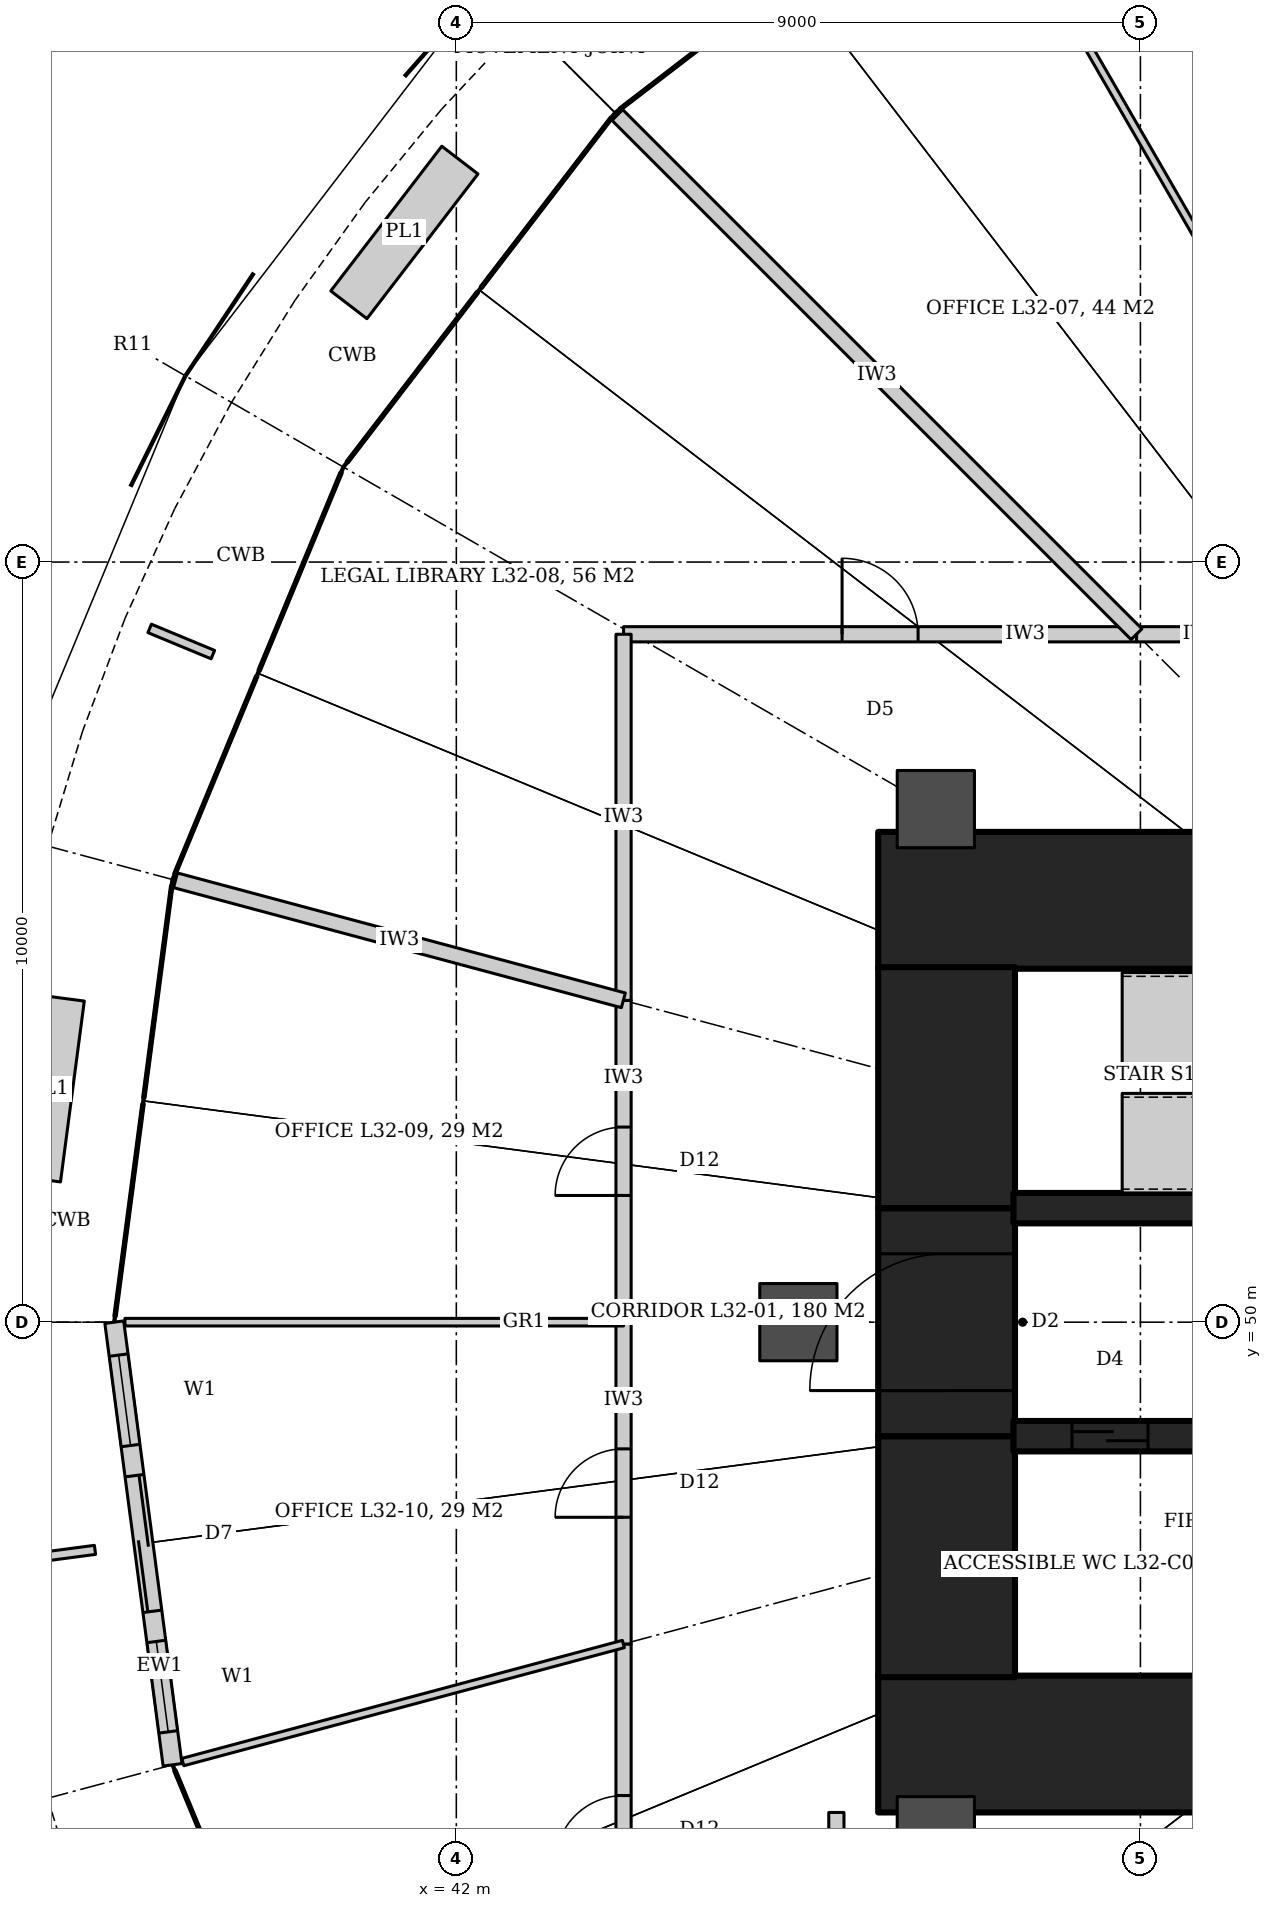
"""IFC4 building model, lengths in metres.
Left out: names, types, materials, properties, quantities, classifications, styles, units other than length and angle.
Written with IfcOpenShell. Run it as: python <this file> out.ifc"""

import sys

from ifc_helpers import new_model, si_unit, direction, frame, frame_2d, origin, origin_2d, place, context, subcontext, project, spatial, rectangle, hollow_circle, extrude, element, fill, save


model = new_model("IFC4")
c1 = context("Model", 3, precision=1e-05, world=origin(), true_north=direction((0.0, 1.0)))
c2 = subcontext(c1, "Body", "Model", "MODEL_VIEW")
j1 = project(units=[si_unit("LENGTHUNIT", "METRE"), si_unit("PLANEANGLEUNIT", "RADIAN")], contexts=[c1])
p1 = place(None, origin())
s1 = spatial("IfcSite", under=j1, at=p1, CompositionType="ELEMENT")
p2 = place(p1, origin())
s2 = spatial("IfcBuilding", under=s1, at=p2, CompositionType="ELEMENT")
p3 = place(p2, frame((0.0, 0.0, 135.2)))
s3 = spatial("IfcBuildingStorey", under=s2, at=p3, CompositionType="ELEMENT", Elevation=135.2)
for number, where, z_axis, x_axis in (
    (1, (47.55, 55.55, 0.0), (0.0, 0.0, 1.0), (1.0, 0.0, 0.0)),
    (2, (47.55, 44.45, 0.0), (0.0, 0.0, 1.0), (1.0, 0.0, 0.0)),
):
    element("IfcWall", number, at=place(p3, frame(where, z_axis=z_axis, x_axis=x_axis)), inside=s3, PredefinedType="SHEAR", context=c2, shape_type="SweptSolid", body=[
        extrude(rectangle(XDim=7.85, YDim=1.8, at=frame_2d((3.925, 0.0))), origin(), (0.0, 0.0, 1.0), 4.2),
    ])
p4 = place(p3, frame((48.45, 45.33, 0.0), z_axis=(0.0, 0.0, 1.0), x_axis=(0.0, 1.0, 0.0)))
e3 = element("IfcWall", 3, at=p4, inside=s3, PredefinedType="SHEAR", context=c2, shape_type="SweptSolid", body=[
    extrude(rectangle(XDim=3.17, YDim=1.8, at=frame_2d((1.585, 0.0))), origin(), (0.0, 0.0, 1.0), 4.2),
])
p5 = place(p3, frame((48.45, 48.5, 0.0), z_axis=(0.0, 0.0, 1.0), x_axis=(0.0, 1.0, 0.0)))
e4 = element("IfcWall", 4, at=p5, inside=s3, PredefinedType="SHEAR", context=c2, shape_type="SweptSolid", body=[
    extrude(rectangle(XDim=3.0, YDim=1.8, at=frame_2d((1.5, 0.0))), origin(), (0.0, 0.0, 1.0), 4.2),
])
p6 = place(p5, frame((0.6, 0.0, 0.0)))
e5 = element("IfcOpeningElement", 5, at=p6, cuts=e4, PredefinedType="OPENING", context=c2, shape_type="SweptSolid", body=[
    extrude(rectangle(XDim=1.8, YDim=2.1, at=frame_2d((0.9, 1.05))), frame((0.0, 0.91, 0.0), z_axis=(0.0, -1.0, 0.0), x_axis=(1.0, 0.0, 0.0)), (0.0, 0.0, 1.0), 1.82),
])
p7 = place(p3, frame((48.45, 51.5, 0.0), z_axis=(0.0, 0.0, 1.0), x_axis=(0.0, 1.0, 0.0)))
e6 = element("IfcWall", 6, at=p7, inside=s3, PredefinedType="SHEAR", context=c2, shape_type="SweptSolid", body=[
    extrude(rectangle(XDim=3.17, YDim=1.8, at=frame_2d((1.585, 0.0))), origin(), (0.0, 0.0, 1.0), 4.2),
])
p8 = place(p3, frame((49.33, 51.5, 0.0), z_axis=(0.0, 0.0, 1.0), x_axis=(1.0, 0.0, 0.0)))
e7 = element("IfcWall", 7, at=p8, inside=s3, PredefinedType="SHEAR", context=c2, shape_type="SweptSolid", body=[
    extrude(rectangle(XDim=6.07, YDim=0.4, at=frame_2d((3.035, 0.0))), origin(), (0.0, 0.0, 1.0), 4.2),
])
p9 = place(p8, frame((4.57, 0.0, 0.0)))
e8 = element("IfcOpeningElement", 8, at=p9, cuts=e7, PredefinedType="OPENING", context=c2, shape_type="SweptSolid", body=[
    extrude(rectangle(XDim=1.0, YDim=2.1, at=frame_2d((0.5, 1.05))), frame((0.0, 0.21, 0.0), z_axis=(0.0, -1.0, 0.0), x_axis=(1.0, 0.0, 0.0)), (0.0, 0.0, 1.0), 0.42),
])
p10 = place(p3, frame((49.33, 48.5, 0.0), z_axis=(0.0, 0.0, 1.0), x_axis=(1.0, 0.0, 0.0)))
e9 = element("IfcWall", 9, at=p10, inside=s3, PredefinedType="SHEAR", context=c2, shape_type="SweptSolid", body=[
    extrude(rectangle(XDim=6.07, YDim=0.4, at=frame_2d((3.035, 0.0))), origin(), (0.0, 0.0, 1.0), 4.2),
])
p11 = place(p10, frame((0.77, 0.0, 0.0)))
e10 = element("IfcOpeningElement", 10, at=p11, cuts=e9, PredefinedType="OPENING", context=c2, shape_type="SweptSolid", body=[
    extrude(rectangle(XDim=1.0, YDim=2.1, at=frame_2d((0.5, 1.05))), frame((0.0, 0.21, 0.0), z_axis=(0.0, -1.0, 0.0), x_axis=(1.0, 0.0, 0.0)), (0.0, 0.0, 1.0), 0.42),
])
p12 = place(p10, frame((2.87, 0.0, 0.0)))
e11 = element("IfcOpeningElement", 11, at=p12, cuts=e9, PredefinedType="OPENING", context=c2, shape_type="SweptSolid", body=[
    extrude(rectangle(XDim=0.9, YDim=2.1, at=frame_2d((0.45, 1.05))), frame((0.0, 0.21, 0.0), z_axis=(0.0, -1.0, 0.0), x_axis=(1.0, 0.0, 0.0)), (0.0, 0.0, 1.0), 0.42),
])
p13 = place(p10, frame((4.57, 0.0, 0.0)))
e12 = element("IfcOpeningElement", 12, at=p13, cuts=e9, PredefinedType="OPENING", context=c2, shape_type="SweptSolid", body=[
    extrude(rectangle(XDim=0.9, YDim=2.1, at=frame_2d((0.45, 1.05))), frame((0.0, 0.21, 0.0), z_axis=(0.0, -1.0, 0.0), x_axis=(1.0, 0.0, 0.0)), (0.0, 0.0, 1.0), 0.42),
])
for number, where, z_axis, x_axis in (
    (13, (48.309, 56.75, 0.0), (0.0, 0.0, 1.0), (1.0, 0.0, 0.0)),
    (14, (46.5, 50.0, 0.0), (0.0, 0.0, 1.0), (1.0, 0.0, 0.0)),
    (15, (48.309, 43.25, 0.0), (0.0, 0.0, 1.0), (1.0, 0.0, 0.0)),
):
    element("IfcColumn", number, at=place(p3, frame(where, z_axis=z_axis, x_axis=x_axis)), inside=s3, PredefinedType="COLUMN", context=c2, shape_type="SweptSolid", body=[
        extrude(hollow_circle(Radius=0.508, WallThickness=0.05, at=origin_2d()), origin(), (0.0, 0.0, 1.0), 4.2),
    ])
p14 = place(p3, frame((44.2, 59.05, 0.0), z_axis=(0.0, 0.0, 1.0), x_axis=(1.0, 0.0, 0.0)))
e16 = element("IfcWall", 16, at=p14, inside=s3, PredefinedType="PARTITIONING", context=c2, shape_type="SweptSolid", body=[
    extrude(rectangle(XDim=6.75, YDim=0.2, at=frame_2d((3.375, 0.0))), origin(), (0.0, 0.0, 1.0), 3.02),
])
p15 = place(p14, frame((2.875, 0.0, 0.0)))
e17 = element("IfcOpeningElement", 17, at=p15, cuts=e16, PredefinedType="OPENING", context=c2, shape_type="SweptSolid", body=[
    extrude(rectangle(XDim=1.0, YDim=2.1, at=frame_2d((0.5, 1.05))), frame((0.0, 0.11, 0.0), z_axis=(0.0, -1.0, 0.0), x_axis=(1.0, 0.0, 0.0)), (0.0, 0.0, 1.0), 0.22),
])
p16 = place(p3, frame((50.95, 59.05, 0.0), z_axis=(0.0, 0.0, 1.0), x_axis=(1.0, 0.0, 0.0)))
e18 = element("IfcWall", 18, at=p16, inside=s3, PredefinedType="PARTITIONING", context=c2, shape_type="SweptSolid", body=[
    extrude(rectangle(XDim=3.825, YDim=0.2, at=frame_2d((1.913, 0.0))), origin(), (0.0, 0.0, 1.0), 3.02),
])
p17 = place(p16, frame((1.462, 0.0, 0.0)))
e19 = element("IfcOpeningElement", 19, at=p17, cuts=e18, PredefinedType="OPENING", context=c2, shape_type="SweptSolid", body=[
    extrude(rectangle(XDim=0.9, YDim=2.4, at=frame_2d((0.45, 1.2))), frame((0.0, 0.11, 0.0), z_axis=(0.0, -1.0, 0.0), x_axis=(1.0, 0.0, 0.0)), (0.0, 0.0, 1.0), 0.22),
])
p18 = place(p3, frame((47.0, 43.55, 0.0), z_axis=(0.0, 0.0, 1.0), x_axis=(0.0, -1.0, 0.0)))
e20 = element("IfcWall", 20, at=p18, inside=s3, PredefinedType="PARTITIONING", context=c2, shape_type="SweptSolid", body=[
    extrude(rectangle(XDim=1.056, YDim=0.2, at=frame_2d((0.528, 0.0))), origin(), (0.0, 0.0, 1.0), 3.04),
])
p19 = place(p3, frame((44.2, 40.878, 0.0), z_axis=(0.0, 0.0, 1.0), x_axis=(0.0, 1.0, 0.0)))
e21 = element("IfcWall", 21, at=p19, inside=s3, PredefinedType="PARTITIONING", context=c2, shape_type="SweptSolid", body=[
    extrude(rectangle(XDim=4.888, YDim=0.2, at=frame_2d((2.444, 0.0))), origin(), (0.0, 0.0, 1.0), 3.04),
])
p20 = place(p19, frame((1.994, 0.0, 0.0)))
e22 = element("IfcOpeningElement", 22, at=p20, cuts=e21, PredefinedType="OPENING", context=c2, shape_type="SweptSolid", body=[
    extrude(rectangle(XDim=0.9, YDim=2.4, at=frame_2d((0.45, 1.2))), frame((0.0, 0.11, 0.0), z_axis=(0.0, -1.0, 0.0), x_axis=(1.0, 0.0, 0.0)), (0.0, 0.0, 1.0), 0.22),
])
p21 = place(p3, frame((44.2, 45.766, 0.0), z_axis=(0.0, 0.0, 1.0), x_axis=(0.0, 1.0, 0.0)))
e23 = element("IfcWall", 23, at=p21, inside=s3, PredefinedType="PARTITIONING", context=c2, shape_type="SweptSolid", body=[
    extrude(rectangle(XDim=4.234, YDim=0.2, at=frame_2d((2.117, 0.0))), origin(), (0.0, 0.0, 1.0), 3.04),
])
p22 = place(p21, frame((1.667, 0.0, 0.0)))
e24 = element("IfcOpeningElement", 24, at=p22, cuts=e23, PredefinedType="OPENING", context=c2, shape_type="SweptSolid", body=[
    extrude(rectangle(XDim=0.9, YDim=2.4, at=frame_2d((0.45, 1.2))), frame((0.0, 0.11, 0.0), z_axis=(0.0, -1.0, 0.0), x_axis=(1.0, 0.0, 0.0)), (0.0, 0.0, 1.0), 0.22),
])
p23 = place(p3, frame((44.2, 50.0, 0.0), z_axis=(0.0, 0.0, 1.0), x_axis=(0.0, 1.0, 0.0)))
e25 = element("IfcWall", 25, at=p23, inside=s3, PredefinedType="PARTITIONING", context=c2, shape_type="SweptSolid", body=[
    extrude(rectangle(XDim=4.234, YDim=0.2, at=frame_2d((2.117, 0.0))), origin(), (0.0, 0.0, 1.0), 3.04),
])
p24 = place(p23, frame((1.667, 0.0, 0.0)))
e26 = element("IfcOpeningElement", 26, at=p24, cuts=e25, PredefinedType="OPENING", context=c2, shape_type="SweptSolid", body=[
    extrude(rectangle(XDim=0.9, YDim=2.4, at=frame_2d((0.45, 1.2))), frame((0.0, 0.11, 0.0), z_axis=(0.0, -1.0, 0.0), x_axis=(1.0, 0.0, 0.0)), (0.0, 0.0, 1.0), 0.22),
])
p25 = place(p3, frame((44.2, 54.234, 0.0), z_axis=(0.0, 0.0, 1.0), x_axis=(0.0, 1.0, 0.0)))
e27 = element("IfcWall", 27, at=p25, inside=s3, PredefinedType="PARTITIONING", context=c2, shape_type="SweptSolid", body=[
    extrude(rectangle(XDim=4.816, YDim=0.2, at=frame_2d((2.408, 0.0))), origin(), (0.0, 0.0, 1.0), 3.04),
])
p26 = place(p3, frame((52.916, 62.27, 0.0), z_axis=(0.0, 0.0, 1.0), x_axis=(-0.499996941814, 0.866027169422, 0.0)))
e28 = element("IfcWall", 28, at=p26, inside=s3, PredefinedType="PARTITIONING", context=c2, shape_type="SweptSolid", body=[
    extrude(rectangle(XDim=8.392, YDim=0.1, at=frame_2d((4.196, 0.0))), origin(), (0.0, 0.0, 1.0), 3.04),
])
p27 = place(p3, frame((50.949, 59.051, 0.0), z_axis=(0.0, 0.0, 1.0), x_axis=(-0.707106781187, 0.707106781187, 0.0)))
e29 = element("IfcWall", 29, at=p27, inside=s3, PredefinedType="PARTITIONING", context=c2, shape_type="SweptSolid", body=[
    extrude(rectangle(XDim=9.76, YDim=0.2, at=frame_2d((4.88, 0.0))), origin(), (0.0, 0.0, 1.0), 3.02),
])
p28 = place(p3, frame((44.198, 54.234, 0.0), z_axis=(0.0, 0.0, 1.0), x_axis=(-0.965923795283, 0.258826624802, 0.0)))
e30 = element("IfcWall", 30, at=p28, inside=s3, PredefinedType="PARTITIONING", context=c2, shape_type="SweptSolid", body=[
    extrude(rectangle(XDim=6.2, YDim=0.2, at=frame_2d((3.1, 0.0))), origin(), (0.0, 0.0, 1.0), 3.04),
])
p29 = place(p3, frame((44.2, 50.0, 0.0), z_axis=(0.0, 0.0, 1.0), x_axis=(-1.0, 0.0, 0.0)))
e31 = element("IfcWall", 31, at=p29, inside=s3, PredefinedType="PARTITIONING", context=c2, shape_type="SweptSolid", body=[
    extrude(rectangle(XDim=6.66, YDim=0.1, at=frame_2d((3.33, 0.0))), origin(), (0.0, 0.0, 1.0), 3.04),
])
p30 = place(p3, frame((44.198, 45.766, 0.0), z_axis=(0.0, 0.0, 1.0), x_axis=(-0.965932688119, -0.258793435045, 0.0)))
e32 = element("IfcWall", 32, at=p30, inside=s3, PredefinedType="PARTITIONING", context=c2, shape_type="SweptSolid", body=[
    extrude(rectangle(XDim=6.1, YDim=0.1, at=frame_2d((3.05, 0.0))), origin(), (0.0, 0.0, 1.0), 3.04),
])
p31 = place(p3, frame((37.4, 50.0, 0.0), z_axis=(0.0, 0.0, 1.0), x_axis=(0.130556203128, -0.991440909901, 0.0)))
e33 = element("IfcWall", 33, at=p31, inside=s3, PredefinedType="SOLIDWALL", context=c2, shape_type="SweptSolid", body=[
    extrude(rectangle(XDim=5.9, YDim=0.25, at=frame_2d((2.95, 0.0))), origin(), (0.0, 0.0, 1.0), 4.04),
])
p32 = place(p31, frame((2.05, 0.0, 0.0)))
e34 = element("IfcOpeningElement", 34, at=p32, cuts=e33, PredefinedType="OPENING", context=c2, shape_type="SweptSolid", body=[
    extrude(rectangle(XDim=1.8, YDim=2.4, at=frame_2d((0.9, 1.2))), frame((0.0, 0.135, 0.0), z_axis=(0.0, -1.0, 0.0), x_axis=(1.0, 0.0, 0.0)), (0.0, 0.0, 1.0), 0.27),
])
p33 = place(p31, frame((0.45, 0.0, 0.0)))
e35 = element("IfcOpeningElement", 35, at=p33, cuts=e33, PredefinedType="OPENING", context=c2, shape_type="SweptSolid", body=[
    extrude(rectangle(XDim=1.2, YDim=2.4, at=frame_2d((0.6, 1.2))), frame((0.0, 0.135, 0.0), z_axis=(0.0, -1.0, 0.0), x_axis=(1.0, 0.0, 0.0)), (0.0, 0.0, 1.0), 0.27),
])
p34 = place(p31, frame((4.25, 0.0, 0.0)))
e36 = element("IfcOpeningElement", 36, at=p34, cuts=e33, PredefinedType="OPENING", context=c2, shape_type="SweptSolid", body=[
    extrude(rectangle(XDim=1.2, YDim=2.4, at=frame_2d((0.6, 1.2))), frame((0.0, 0.135, 0.0), z_axis=(0.0, -1.0, 0.0), x_axis=(1.0, 0.0, 0.0)), (0.0, 0.0, 1.0), 0.27),
])
p35 = place(p15, origin())
e37 = element("IfcDoor", 37, at=p35, inside=s3, OperationType="SINGLE_SWING_LEFT", PredefinedType="DOOR", context=c2, shape_type="SweptSolid", body=[
    extrude(rectangle(XDim=1.0, YDim=2.1, at=frame_2d((0.5, 1.05))), frame((0.0, 0.025, 0.0), z_axis=(0.0, -1.0, 0.0), x_axis=(1.0, 0.0, 0.0)), (0.0, 0.0, 1.0), 0.05),
])
fill(e17, e37)
p36 = place(p24, origin())
e38 = element("IfcDoor", 38, at=p36, inside=s3, OperationType="SINGLE_SWING_LEFT", PredefinedType="DOOR", context=c2, shape_type="SweptSolid", body=[
    extrude(rectangle(XDim=0.9, YDim=2.4, at=frame_2d((0.45, 1.2))), frame((0.0, 0.025, 0.0), z_axis=(0.0, -1.0, 0.0), x_axis=(1.0, 0.0, 0.0)), (0.0, 0.0, 1.0), 0.05),
])
fill(e26, e38)
p37 = place(p22, origin())
e39 = element("IfcDoor", 39, at=p37, inside=s3, OperationType="SINGLE_SWING_LEFT", PredefinedType="DOOR", context=c2, shape_type="SweptSolid", body=[
    extrude(rectangle(XDim=0.9, YDim=2.4, at=frame_2d((0.45, 1.2))), frame((0.0, 0.025, 0.0), z_axis=(0.0, -1.0, 0.0), x_axis=(1.0, 0.0, 0.0)), (0.0, 0.0, 1.0), 0.05),
])
fill(e24, e39)
p38 = place(p20, origin())
e40 = element("IfcDoor", 40, at=p38, inside=s3, OperationType="SINGLE_SWING_LEFT", PredefinedType="DOOR", context=c2, shape_type="SweptSolid", body=[
    extrude(rectangle(XDim=0.9, YDim=2.4, at=frame_2d((0.45, 1.2))), frame((0.0, 0.025, 0.0), z_axis=(0.0, -1.0, 0.0), x_axis=(1.0, 0.0, 0.0)), (0.0, 0.0, 1.0), 0.05),
])
fill(e22, e40)
p39 = place(p32, origin())
e41 = element("IfcDoor", 41, at=p39, inside=s3, OperationType="DOUBLE_DOOR_SLIDING", PredefinedType="DOOR", context=c2, shape_type="SweptSolid", body=[
    extrude(rectangle(XDim=1.8, YDim=2.4, at=frame_2d((0.9, 1.2))), frame((0.0, 0.025, 0.0), z_axis=(0.0, -1.0, 0.0), x_axis=(1.0, 0.0, 0.0)), (0.0, 0.0, 1.0), 0.05),
])
fill(e34, e41)
p40 = place(p33, origin())
e42 = element("IfcWindow", 42, at=p40, inside=s3, PartitioningType="SINGLE_PANEL", PredefinedType="WINDOW", context=c2, shape_type="SweptSolid", body=[
    extrude(rectangle(XDim=1.2, YDim=2.4, at=frame_2d((0.6, 1.2))), frame((0.0, 0.03, 0.0), z_axis=(0.0, -1.0, 0.0), x_axis=(1.0, 0.0, 0.0)), (0.0, 0.0, 1.0), 0.06),
])
fill(e35, e42)
p41 = place(p34, origin())
e43 = element("IfcWindow", 43, at=p41, inside=s3, PartitioningType="SINGLE_PANEL", PredefinedType="WINDOW", context=c2, shape_type="SweptSolid", body=[
    extrude(rectangle(XDim=1.2, YDim=2.4, at=frame_2d((0.6, 1.2))), frame((0.0, 0.03, 0.0), z_axis=(0.0, -1.0, 0.0), x_axis=(1.0, 0.0, 0.0)), (0.0, 0.0, 1.0), 0.06),
])
fill(e36, e43)
p42 = place(p11, origin())
e44 = element("IfcDoor", 44, at=p42, inside=s3, OperationType="SLIDING_TO_LEFT", PredefinedType="DOOR", context=c2, shape_type="SweptSolid", body=[
    extrude(rectangle(XDim=1.0, YDim=2.1, at=frame_2d((0.5, 1.05))), frame((0.0, 0.025, 0.0), z_axis=(0.0, -1.0, 0.0), x_axis=(1.0, 0.0, 0.0)), (0.0, 0.0, 1.0), 0.05),
])
fill(e10, e44)
p43 = place(p6, origin())
e45 = element("IfcDoor", 45, at=p43, inside=s3, OperationType="DOUBLE_DOOR_DOUBLE_SWING", PredefinedType="DOOR", context=c2, shape_type="SweptSolid", body=[
    extrude(rectangle(XDim=1.8, YDim=2.1, at=frame_2d((0.9, 1.05))), frame((0.0, 0.025, 0.0), z_axis=(0.0, -1.0, 0.0), x_axis=(1.0, 0.0, 0.0)), (0.0, 0.0, 1.0), 0.05),
])
fill(e5, e45)
save(model, sys.argv[1])
